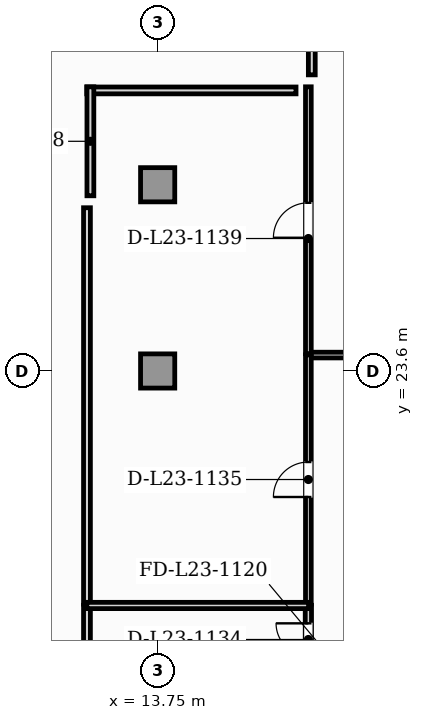
"""IFC4 building model, lengths in metres.
Left out: names, types, materials, properties, quantities, classifications, styles, units other than length and angle.
Written with IfcOpenShell. Run it as: python <this file> out.ifc"""

import sys

from ifc_helpers import new_model, si_unit, direction, frame, frame_2d, origin, origin_2d, place, context, subcontext, project, spatial, rectangle, extrude, element, fill, save


model = new_model("IFC4")
c1 = context("Model", 3, precision=1e-05, world=origin(), true_north=direction((0.0, 1.0)))
c2 = subcontext(c1, "Body", "Model", "MODEL_VIEW")
j1 = project(units=[si_unit("LENGTHUNIT", "METRE"), si_unit("PLANEANGLEUNIT", "RADIAN")], contexts=[c1])
p1 = place(None, origin())
s1 = spatial("IfcSite", under=j1, at=p1, CompositionType="ELEMENT")
p2 = place(p1, origin())
s2 = spatial("IfcBuilding", under=s1, at=p2, CompositionType="ELEMENT")
p3 = place(p2, frame((0.0, 0.0, 96.45)))
s3 = spatial("IfcBuildingStorey", under=s2, at=p3, CompositionType="ELEMENT", Elevation=96.45)
for number, where, z_axis, x_axis in (
    (1, (13.75, 23.6, 0.0), (0.0, 0.0, 1.0), (1.0, 0.0, 0.0)),
    (2, (13.75, 28.5, 0.0), (0.0, 0.0, 1.0), (1.0, 0.0, 0.0)),
):
    element("IfcColumn", number, at=place(p3, frame(where, z_axis=z_axis, x_axis=x_axis)), inside=s3, PredefinedType="COLUMN", context=c2, shape_type="SweptSolid", body=[
        extrude(rectangle(XDim=0.9, YDim=0.9, at=origin_2d()), origin(), (0.0, 0.0, 1.0), 3.85),
    ])
p4 = place(p3, frame((11.89, 15.635, 0.0), z_axis=(0.0, 0.0, 1.0), x_axis=(0.0, 1.0, 0.0)))
e3 = element("IfcWall", 3, at=p4, inside=s3, PredefinedType="PARTITIONING", context=c2, shape_type="SweptSolid", body=[
    extrude(rectangle(XDim=1.8, YDim=0.18, at=frame_2d((0.9, 0.0))), origin(), (0.0, 0.0, 1.0), 3.6),
])
p5 = place(p3, frame((11.89, 17.465, 0.0), z_axis=(0.0, 0.0, 1.0), x_axis=(0.0, 1.0, 0.0)))
e4 = element("IfcWall", 4, at=p5, inside=s3, PredefinedType="PARTITIONING", context=c2, shape_type="SweptSolid", body=[
    extrude(rectangle(XDim=10.43, YDim=0.18, at=frame_2d((5.215, 0.0))), origin(), (0.0, 0.0, 1.0), 3.6),
])
p6 = place(p3, frame((17.71, 24.019, 0.0), z_axis=(0.0, 0.0, 1.0), x_axis=(1.0, 0.0, 0.0)))
e5 = element("IfcWall", 5, at=p6, inside=s3, PredefinedType="PARTITIONING", context=c2, shape_type="SweptSolid", body=[
    extrude(rectangle(XDim=4.99, YDim=0.15, at=frame_2d((2.495, 0.0))), origin(), (0.0, 0.0, 1.0), 3.6),
])
p7 = place(p6, frame((1.287, 0.0, 0.0)))
e6 = element("IfcOpeningElement", 6, at=p7, cuts=e5, PredefinedType="OPENING", context=c2, shape_type="SweptSolid", body=[
    extrude(rectangle(XDim=0.92, YDim=2.1, at=frame_2d((0.46, 1.05))), frame((0.0, 0.085, 0.0), z_axis=(0.0, -1.0, 0.0), x_axis=(1.0, 0.0, 0.0)), (0.0, 0.0, 1.0), 0.17),
])
p8 = place(p3, frame((17.716, 15.635, 0.0), z_axis=(0.0, 0.0, 1.0), x_axis=(0.0, 1.0, 0.0)))
e7 = element("IfcWall", 7, at=p8, inside=s3, PredefinedType="PLUMBINGWALL", context=c2, shape_type="SweptSolid", body=[
    extrude(rectangle(XDim=1.8, YDim=0.165, at=frame_2d((0.9, 0.0))), origin(), (0.0, 0.0, 1.0), 3.6),
])
p9 = place(p8, frame((0.475, 0.0, 0.0)))
e8 = element("IfcOpeningElement", 8, at=p9, cuts=e7, PredefinedType="OPENING", context=c2, shape_type="SweptSolid", body=[
    extrude(rectangle(XDim=0.85, YDim=2.1, at=frame_2d((0.425, 1.05))), frame((0.0, 0.093, 0.0), z_axis=(0.0, -1.0, 0.0), x_axis=(1.0, 0.0, 0.0)), (0.0, 0.0, 1.0), 0.185),
])
p10 = place(p3, frame((17.716, 17.465, 0.0), z_axis=(0.0, 0.0, 1.0), x_axis=(0.0, 1.0, 0.0)))
e9 = element("IfcWall", 9, at=p10, inside=s3, PredefinedType="PARTITIONING", context=c2, shape_type="SweptSolid", body=[
    extrude(rectangle(XDim=6.559, YDim=0.15, at=frame_2d((3.279, 0.0))), origin(), (0.0, 0.0, 1.0), 3.6),
])
p11 = place(p10, frame((2.819, 0.0, 0.0)))
e10 = element("IfcOpeningElement", 10, at=p11, cuts=e9, PredefinedType="OPENING", context=c2, shape_type="SweptSolid", body=[
    extrude(rectangle(XDim=0.92, YDim=2.1, at=frame_2d((0.46, 1.05))), frame((0.0, 0.085, 0.0), z_axis=(0.0, -1.0, 0.0), x_axis=(1.0, 0.0, 0.0)), (0.0, 0.0, 1.0), 0.17),
])
p12 = place(p3, frame((17.716, 24.054, 0.0), z_axis=(0.0, 0.0, 1.0), x_axis=(0.0, 1.0, 0.0)))
e11 = element("IfcWall", 11, at=p12, inside=s3, PredefinedType="PARTITIONING", context=c2, shape_type="SweptSolid", body=[
    extrude(rectangle(XDim=7.023, YDim=0.15, at=frame_2d((3.512, 0.0))), origin(), (0.0, 0.0, 1.0), 3.6),
])
p13 = place(p12, frame((3.052, 0.0, 0.0)))
e12 = element("IfcOpeningElement", 12, at=p13, cuts=e11, PredefinedType="OPENING", context=c2, shape_type="SweptSolid", body=[
    extrude(rectangle(XDim=0.92, YDim=2.1, at=frame_2d((0.46, 1.05))), frame((0.0, 0.085, 0.0), z_axis=(0.0, -1.0, 0.0), x_axis=(1.0, 0.0, 0.0)), (0.0, 0.0, 1.0), 0.17),
])
p14 = place(p3, frame((11.885, 17.43, 0.0), z_axis=(0.0, 0.0, 1.0), x_axis=(1.0, 0.0, 0.0)))
e13 = element("IfcWall", 13, at=p14, inside=s3, PredefinedType="PLUMBINGWALL", context=c2, shape_type="SweptSolid", body=[
    extrude(rectangle(XDim=5.835, YDim=0.165, at=frame_2d((2.918, 0.0))), origin(), (0.0, 0.0, 1.0), 3.6),
])
p15 = place(p3, frame((17.805, 31.392, 0.0), z_axis=(0.0, 0.0, 1.0), x_axis=(0.0, 1.0, 0.0)))
e14 = element("IfcWall", 14, at=p15, inside=s3, PredefinedType="PARTITIONING", context=c2, shape_type="SweptSolid", body=[
    extrude(rectangle(XDim=2.293, YDim=0.18, at=frame_2d((1.146, 0.0))), origin(), (0.0, 0.0, 1.0), 3.6),
])
p16 = place(p3, frame((11.885, 30.982, 0.0), z_axis=(0.0, 0.0, 1.0), x_axis=(1.0, 0.0, 0.0)))
e15 = element("IfcWall", 15, at=p16, inside=s3, PredefinedType="PARTITIONING", context=c2, shape_type="SweptSolid", body=[
    extrude(rectangle(XDim=5.505, YDim=0.18, at=frame_2d((2.753, 0.0))), origin(), (0.0, 0.0, 1.0), 3.6),
])
p17 = place(p3, frame((11.98, 28.21, 0.0), z_axis=(0.0, 0.0, 1.0), x_axis=(0.0, 1.0, 0.0)))
e16 = element("IfcWall", 16, at=p17, inside=s3, PredefinedType="PARTITIONING", context=c2, shape_type="SweptSolid", body=[
    extrude(rectangle(XDim=2.867, YDim=0.18, at=frame_2d((1.434, 0.0))), origin(), (0.0, 0.0, 1.0), 3.6),
])
p18 = place(p9, origin())
e17 = element("IfcDoor", 17, at=p18, inside=s3, OperationType="SINGLE_SWING_RIGHT", PredefinedType="DOOR", context=c2, shape_type="SweptSolid", body=[
    extrude(rectangle(XDim=0.85, YDim=2.1, at=frame_2d((0.425, 1.05))), frame((0.0, 0.025, 0.0), z_axis=(0.0, -1.0, 0.0), x_axis=(1.0, 0.0, 0.0)), (0.0, 0.0, 1.0), 0.05),
])
fill(e8, e17)
p19 = place(p11, origin())
e18 = element("IfcDoor", 18, at=p19, inside=s3, OperationType="SINGLE_SWING_LEFT", PredefinedType="DOOR", context=c2, shape_type="SweptSolid", body=[
    extrude(rectangle(XDim=0.92, YDim=2.1, at=frame_2d((0.46, 1.05))), frame((0.0, 0.025, 0.0), z_axis=(0.0, -1.0, 0.0), x_axis=(1.0, 0.0, 0.0)), (0.0, 0.0, 1.0), 0.05),
])
fill(e10, e18)
p20 = place(p13, origin())
e19 = element("IfcDoor", 19, at=p20, inside=s3, OperationType="SINGLE_SWING_LEFT", PredefinedType="DOOR", context=c2, shape_type="SweptSolid", body=[
    extrude(rectangle(XDim=0.92, YDim=2.1, at=frame_2d((0.46, 1.05))), frame((0.0, 0.025, 0.0), z_axis=(0.0, -1.0, 0.0), x_axis=(1.0, 0.0, 0.0)), (0.0, 0.0, 1.0), 0.05),
])
fill(e12, e19)
save(model, sys.argv[1])
